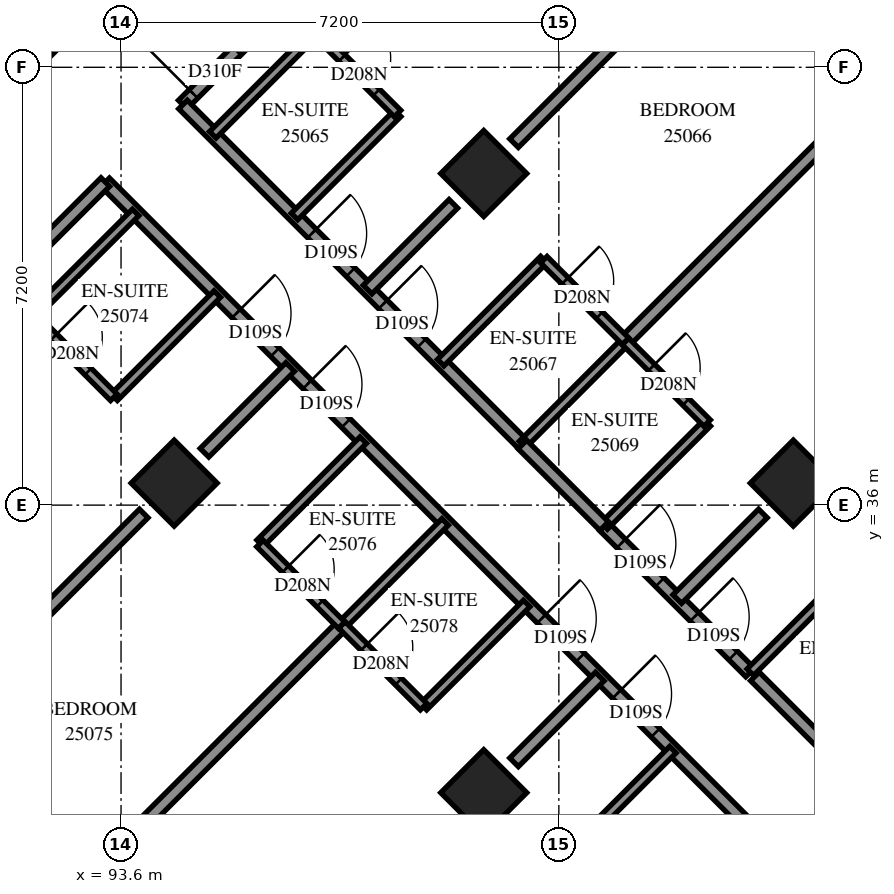
"""IFC4 building model, lengths in metres.
Left out: names, types, materials, properties, quantities, classifications, styles, units other than length and angle.
Written with IfcOpenShell. Run it as: python <this file> out.ifc"""

import sys

from ifc_helpers import new_model, si_unit, direction, frame, frame_2d, origin, origin_2d, place, context, subcontext, project, spatial, rectangle, extrude, element, fill, save


model = new_model("IFC4")
c1 = context("Model", 3, precision=1e-05, world=origin(), true_north=direction((0.0, 1.0)))
c2 = subcontext(c1, "Body", "Model", "MODEL_VIEW")
j1 = project(units=[si_unit("LENGTHUNIT", "METRE"), si_unit("PLANEANGLEUNIT", "RADIAN")], contexts=[c1])
p1 = place(None, origin())
s1 = spatial("IfcSite", under=j1, at=p1, CompositionType="ELEMENT")
p2 = place(p1, origin())
s2 = spatial("IfcBuilding", under=s1, at=p2, CompositionType="ELEMENT")
p3 = place(p2, frame((0.0, 0.0, 94.8)))
s3 = spatial("IfcBuildingStorey", under=s2, at=p3, CompositionType="ELEMENT", Elevation=94.8)
for number, where, z_axis, x_axis in (
    (1, (99.565, 41.453, 0.0), (0.0, 0.0, 1.0), (0.707, -0.707, 0.0)),
    (2, (94.474, 36.362, 0.0), (0.0, 0.0, 1.0), (0.707, -0.707, 0.0)),
    (3, (104.656, 36.362, 0.0), (0.0, 0.0, 1.0), (0.707, -0.707, 0.0)),
    (4, (99.565, 31.271, 0.0), (0.0, 0.0, 1.0), (0.707, -0.707, 0.0)),
):
    element("IfcColumn", number, at=place(p3, frame(where, z_axis=z_axis, x_axis=x_axis)), inside=s3, PredefinedType="COLUMN", context=c2, shape_type="SweptSolid", body=[
        extrude(rectangle(XDim=1.0, YDim=1.0, at=origin_2d()), origin(), (0.0, 0.0, 1.0), 3.1),
    ])
p4 = place(p3, frame((87.12, 38.625, -0.3), z_axis=(0.0, 0.0, 1.0), x_axis=(0.7071067812, 0.7071067812, 0.0)))
e5 = element("IfcWall", 5, at=p4, inside=s3, PredefinedType="SHEAR", context=c2, shape_type="SweptSolid", body=[
    extrude(rectangle(XDim=14.4, YDim=0.8, at=frame_2d((7.2, 0.0))), origin(), (0.0, 0.0, 1.0), 2.7),
])
p5 = place(p4, frame((4.55, 0.0, 0.3)))
e6 = element("IfcOpeningElement", 6, at=p5, cuts=e5, PredefinedType="OPENING", context=c2, shape_type="SweptSolid", body=[
    extrude(rectangle(XDim=1.1, YDim=2.1, at=frame_2d((0.55, 1.05))), frame((0.0, 0.41, 0.0), z_axis=(0.0, -1.0, 0.0), x_axis=(1.0, 0.0, 0.0)), (0.0, 0.0, 1.0), 0.82),
])
p6 = place(p4, frame((11.35, 0.0, 0.3)))
e7 = element("IfcOpeningElement", 7, at=p6, cuts=e5, PredefinedType="OPENING", context=c2, shape_type="SweptSolid", body=[
    extrude(rectangle(XDim=1.1, YDim=2.1, at=frame_2d((0.55, 1.05))), frame((0.0, 0.41, 0.0), z_axis=(0.0, -1.0, 0.0), x_axis=(1.0, 0.0, 0.0)), (0.0, 0.0, 1.0), 0.82),
])
p7 = place(p3, frame((93.339, 41.309, 0.0), z_axis=(0.0, 0.0, 1.0), x_axis=(0.7071067812, -0.7071067812, 0.0)))
e8 = element("IfcWall", 8, at=p7, inside=s3, PredefinedType="PARTITIONING", context=c2, shape_type="SweptSolid", body=[
    extrude(rectangle(XDim=18.702, YDim=0.2, at=frame_2d((9.351, 0.0))), origin(), (0.0, 0.0, 1.0), 3.1),
])
p8 = place(p7, frame((3.05, 0.0, 0.0)))
e9 = element("IfcOpeningElement", 9, at=p8, cuts=e8, PredefinedType="OPENING", context=c2, shape_type="SweptSolid", body=[
    extrude(rectangle(XDim=0.9, YDim=2.1, at=frame_2d((0.45, 1.05))), frame((0.0, 0.11, 0.0), z_axis=(0.0, -1.0, 0.0), x_axis=(1.0, 0.0, 0.0)), (0.0, 0.0, 1.0), 0.22),
])
p9 = place(p7, frame((4.7, 0.0, 0.0)))
e10 = element("IfcOpeningElement", 10, at=p9, cuts=e8, PredefinedType="OPENING", context=c2, shape_type="SweptSolid", body=[
    extrude(rectangle(XDim=0.9, YDim=2.1, at=frame_2d((0.45, 1.05))), frame((0.0, 0.11, 0.0), z_axis=(0.0, -1.0, 0.0), x_axis=(1.0, 0.0, 0.0)), (0.0, 0.0, 1.0), 0.22),
])
p10 = place(p7, frame((10.149, 0.0, 0.0)))
e11 = element("IfcOpeningElement", 11, at=p10, cuts=e8, PredefinedType="OPENING", context=c2, shape_type="SweptSolid", body=[
    extrude(rectangle(XDim=0.9, YDim=2.1, at=frame_2d((0.45, 1.05))), frame((0.0, 0.11, 0.0), z_axis=(0.0, -1.0, 0.0), x_axis=(1.0, 0.0, 0.0)), (0.0, 0.0, 1.0), 0.22),
])
p11 = place(p7, frame((11.9, 0.0, 0.0)))
e12 = element("IfcOpeningElement", 12, at=p11, cuts=e8, PredefinedType="OPENING", context=c2, shape_type="SweptSolid", body=[
    extrude(rectangle(XDim=0.9, YDim=2.1, at=frame_2d((0.45, 1.05))), frame((0.0, 0.11, 0.0), z_axis=(0.0, -1.0, 0.0), x_axis=(1.0, 0.0, 0.0)), (0.0, 0.0, 1.0), 0.22),
])
p12 = place(p7, frame((17.45, 0.0, 0.0)))
e13 = element("IfcOpeningElement", 13, at=p12, cuts=e8, PredefinedType="OPENING", context=c2, shape_type="SweptSolid", body=[
    extrude(rectangle(XDim=0.9, YDim=2.1, at=frame_2d((0.45, 1.05))), frame((0.0, 0.11, 0.0), z_axis=(0.0, -1.0, 0.0), x_axis=(1.0, 0.0, 0.0)), (0.0, 0.0, 1.0), 0.22),
])
p13 = place(p3, frame((86.835, 34.806, 0.0), z_axis=(0.0, 0.0, 1.0), x_axis=(0.7071067812, 0.7071067812, 0.0)))
e14 = element("IfcWall", 14, at=p13, inside=s3, PredefinedType="PARTITIONING", context=c2, shape_type="SweptSolid", body=[
    extrude(rectangle(XDim=9.201, YDim=0.2, at=frame_2d((4.601, 0.0))), origin(), (0.0, 0.0, 1.0), 3.1),
])
p14 = place(p3, frame((94.615, 42.587, 0.0), z_axis=(0.0, 0.0, 1.0), x_axis=(0.7071067812, 0.7071067812, 0.0)))
e15 = element("IfcWall", 15, at=p14, inside=s3, PredefinedType="PARTITIONING", context=c2, shape_type="SweptSolid", body=[
    extrude(rectangle(XDim=9.198, YDim=0.2, at=frame_2d((4.599, 0.0))), origin(), (0.0, 0.0, 1.0), 3.1),
])
p15 = place(p14, frame((0.248, 0.0, 0.0)))
e16 = element("IfcOpeningElement", 16, at=p15, cuts=e15, PredefinedType="OPENING", context=c2, shape_type="SweptSolid", body=[
    extrude(rectangle(XDim=1.0, YDim=2.1, at=frame_2d((0.5, 1.05))), frame((0.0, 0.11, 0.0), z_axis=(0.0, -1.0, 0.0), x_axis=(1.0, 0.0, 0.0)), (0.0, 0.0, 1.0), 0.22),
])
p16 = place(p3, frame((101.896, 38.698, 0.0), z_axis=(0.0, 0.0, 1.0), x_axis=(0.7072241589, 0.706989384, 0.0)))
e17 = element("IfcWall", 17, at=p16, inside=s3, PredefinedType="PARTITIONING", context=c2, shape_type="SweptSolid", body=[
    extrude(rectangle(XDim=8.519, YDim=0.2, at=frame_2d((4.259, 0.0))), origin(), (0.0, 0.0, 1.0), 3.1),
])
p17 = place(p3, frame((91.461, 28.253, 0.0), z_axis=(0.0, 0.0, 1.0), x_axis=(0.7072231255, 0.7069904178, 0.0)))
e18 = element("IfcWall", 18, at=p17, inside=s3, PredefinedType="PARTITIONING", context=c2, shape_type="SweptSolid", body=[
    extrude(rectangle(XDim=8.165, YDim=0.2, at=frame_2d((4.082, 0.0))), origin(), (0.0, 0.0, 1.0), 3.1),
])
p18 = place(p3, frame((94.62, 42.587, 0.0), z_axis=(0.0, 0.0, 1.0), x_axis=(0.7071067812, -0.7071067812, 0.0)))
e19 = element("IfcWall", 19, at=p18, inside=s3, PredefinedType="PARTITIONING", context=c2, shape_type="SweptSolid", body=[
    extrude(rectangle(XDim=7.9, YDim=0.2, at=frame_2d((3.95, 0.0))), origin(), (0.0, 0.0, 1.0), 3.1),
])
p19 = place(p18, frame((2.998, 0.0, 0.0)))
e20 = element("IfcOpeningElement", 20, at=p19, cuts=e19, PredefinedType="OPENING", context=c2, shape_type="SweptSolid", body=[
    extrude(rectangle(XDim=0.9, YDim=2.1, at=frame_2d((0.45, 1.05))), frame((0.0, 0.11, 0.0), z_axis=(0.0, -1.0, 0.0), x_axis=(1.0, 0.0, 0.0)), (0.0, 0.0, 1.0), 0.22),
])
p20 = place(p18, frame((4.649, 0.0, 0.0)))
e21 = element("IfcOpeningElement", 21, at=p20, cuts=e19, PredefinedType="OPENING", context=c2, shape_type="SweptSolid", body=[
    extrude(rectangle(XDim=0.9, YDim=2.1, at=frame_2d((0.45, 1.05))), frame((0.0, 0.11, 0.0), z_axis=(0.0, -1.0, 0.0), x_axis=(1.0, 0.0, 0.0)), (0.0, 0.0, 1.0), 0.22),
])
for number, where, z_axis, x_axis in (
    (22, (89.881, 31.771, 0.0), (0.0, 0.0, 1.0), (0.707, 0.707, 0.0)),
    (23, (100.063, 41.953, 0.0), (0.0, 0.0, 1.0), (0.707, 0.707, 0.0)),
):
    element("IfcWall", number, at=place(p3, frame(where, z_axis=z_axis, x_axis=x_axis)), inside=s3, PredefinedType="PARTITIONING", context=c2, shape_type="SweptSolid", body=[
        extrude(rectangle(XDim=5.787, YDim=0.2, at=frame_2d((2.893, 0.0))), origin(), (0.0, 0.0, 1.0), 3.1),
    ])
p21 = place(p3, frame((104.023, 33.184, 0.0), z_axis=(0.0, 0.0, 1.0), x_axis=(0.7071067812, -0.7071067812, 0.0)))
e24 = element("IfcWall", 24, at=p21, inside=s3, PredefinedType="PARTITIONING", context=c2, shape_type="SweptSolid", body=[
    extrude(rectangle(XDim=5.399, YDim=0.2, at=frame_2d((2.7, 0.0))), origin(), (0.0, 0.0, 1.0), 3.1),
])
p22 = place(p21, frame((4.08, 0.0, 0.0)))
e25 = element("IfcOpeningElement", 25, at=p22, cuts=e24, PredefinedType="OPENING", context=c2, shape_type="SweptSolid", body=[
    extrude(rectangle(XDim=0.9, YDim=2.1, at=frame_2d((0.45, 1.05))), frame((0.0, 0.11, 0.0), z_axis=(0.0, -1.0, 0.0), x_axis=(1.0, 0.0, 0.0)), (0.0, 0.0, 1.0), 0.22),
])
p23 = place(p3, frame((101.541, 35.651, 0.0), z_axis=(0.0, 0.0, 1.0), x_axis=(0.7071067812, -0.7071067812, 0.0)))
e26 = element("IfcWall", 26, at=p23, inside=s3, PredefinedType="PARTITIONING", context=c2, shape_type="SweptSolid", body=[
    extrude(rectangle(XDim=3.4, YDim=0.2, at=frame_2d((1.7, 0.0))), origin(), (0.0, 0.0, 1.0), 3.1),
])
p24 = place(p23, frame((0.4, 0.0, 0.0)))
e27 = element("IfcOpeningElement", 27, at=p24, cuts=e26, PredefinedType="OPENING", context=c2, shape_type="SweptSolid", body=[
    extrude(rectangle(XDim=0.9, YDim=2.1, at=frame_2d((0.45, 1.05))), frame((0.0, 0.11, 0.0), z_axis=(0.0, -1.0, 0.0), x_axis=(1.0, 0.0, 0.0)), (0.0, 0.0, 1.0), 0.22),
])
p25 = place(p23, frame((2.105, 0.0, 0.0)))
e28 = element("IfcOpeningElement", 28, at=p25, cuts=e26, PredefinedType="OPENING", context=c2, shape_type="SweptSolid", body=[
    extrude(rectangle(XDim=0.9, YDim=2.1, at=frame_2d((0.45, 1.05))), frame((0.0, 0.11, 0.0), z_axis=(0.0, -1.0, 0.0), x_axis=(1.0, 0.0, 0.0)), (0.0, 0.0, 1.0), 0.22),
])
for number, where, z_axis, x_axis in (
    (29, (100.977, 30.281, 0.0), (0.0, 0.0, 1.0), (0.707, 0.707, 0.0)),
    (30, (98.573, 32.685, 0.0), (0.0, 0.0, 1.0), (0.707, 0.707, 0.0)),
):
    element("IfcWall", number, at=place(p3, frame(where, z_axis=z_axis, x_axis=x_axis)), inside=s3, PredefinedType="PARTITIONING", context=c2, shape_type="SweptSolid", body=[
        extrude(rectangle(XDim=2.401, YDim=0.15, at=frame_2d((1.201, 0.0))), origin(), (0.0, 0.0, 1.0), 3.1),
    ])
for number, where, z_axis, x_axis in (
    (31, (92.143, 39.117, 0.0), (0.0, 0.0, 1.0), (0.708, 0.707, 0.0)),
    (32, (93.487, 37.773, 0.0), (0.0, 0.0, 1.0), (0.707, 0.708, 0.0)),
    (33, (97.234, 34.026, 0.0), (0.0, 0.0, 1.0), (0.707, 0.708, 0.0)),
    (34, (100.203, 36.997, 0.0), (0.0, 0.0, 1.0), (0.707, 0.708, 0.0)),
):
    element("IfcWall", number, at=place(p3, frame(where, z_axis=z_axis, x_axis=x_axis)), inside=s3, PredefinedType="PARTITIONING", context=c2, shape_type="SweptSolid", body=[
        extrude(rectangle(XDim=2.4, YDim=0.15, at=frame_2d((1.2, 0.0))), origin(), (0.0, 0.0, 1.0), 3.1),
    ])
for number, where, z_axis, x_axis in (
    (35, (96.453, 40.747, 0.0), (0.0, 0.0, 1.0), (0.707, 0.707, 0.0)),
    (36, (95.109, 42.091, 0.0), (0.0, 0.0, 1.0), (0.707, 0.707, 0.0)),
    (37, (95.887, 35.373, 0.0), (0.0, 0.0, 1.0), (0.707, 0.707, 0.0)),
    (38, (98.857, 38.343, 0.0), (0.0, 0.0, 1.0), (0.707, 0.707, 0.0)),
    (39, (101.545, 35.657, 0.0), (0.0, 0.0, 1.0), (0.707, 0.707, 0.0)),
    (40, (103.949, 33.253, 0.0), (0.0, 0.0, 1.0), (0.707, 0.707, 0.0)),
):
    element("IfcWall", number, at=place(p3, frame(where, z_axis=z_axis, x_axis=x_axis)), inside=s3, PredefinedType="PARTITIONING", context=c2, shape_type="SweptSolid", body=[
        extrude(rectangle(XDim=2.398, YDim=0.15, at=frame_2d((1.199, 0.0))), origin(), (0.0, 0.0, 1.0), 3.1),
    ])
for number, where, z_axis, x_axis in (
    (41, (100.063, 31.771, 0.0), (0.0, 0.0, 1.0), (0.707, 0.707, 0.0)),
    (42, (97.655, 39.545, 0.0), (0.0, 0.0, 1.0), (0.707, 0.707, 0.0)),
    (43, (94.972, 36.862, 0.0), (0.0, 0.0, 1.0), (0.707, 0.707, 0.0)),
):
    element("IfcWall", number, at=place(p3, frame(where, z_axis=z_axis, x_axis=x_axis)), inside=s3, PredefinedType="PARTITIONING", context=c2, shape_type="SweptSolid", body=[
        extrude(rectangle(XDim=1.994, YDim=0.2, at=frame_2d((0.997, 0.0))), origin(), (0.0, 0.0, 1.0), 3.1),
    ])
p26 = place(p3, frame((102.747, 34.455, 0.0), z_axis=(0.0, 0.0, 1.0), x_axis=(0.7071067812, 0.7071067812, 0.0)))
e44 = element("IfcWall", 44, at=p26, inside=s3, PredefinedType="PARTITIONING", context=c2, shape_type="SweptSolid", body=[
    extrude(rectangle(XDim=1.991, YDim=0.2, at=frame_2d((0.996, 0.0))), origin(), (0.0, 0.0, 1.0), 3.1),
])
p27 = place(p3, frame((96.803, 43.783, 0.0), z_axis=(0.0, 0.0, 1.0), x_axis=(0.7071067812, -0.7071067812, 0.0)))
e45 = element("IfcWall", 45, at=p27, inside=s3, PredefinedType="PARTITIONING", context=c2, shape_type="SweptSolid", body=[
    extrude(rectangle(XDim=1.901, YDim=0.15, at=frame_2d((0.95, 0.0))), origin(), (0.0, 0.0, 1.0), 3.1),
])
p28 = place(p27, frame((0.609, 0.0, 0.0)))
e46 = element("IfcOpeningElement", 46, at=p28, cuts=e45, PredefinedType="OPENING", context=c2, shape_type="SweptSolid", body=[
    extrude(rectangle(XDim=0.8, YDim=2.1, at=frame_2d((0.4, 1.05))), frame((0.0, 0.085, 0.0), z_axis=(0.0, -1.0, 0.0), x_axis=(1.0, 0.0, 0.0)), (0.0, 0.0, 1.0), 0.17),
])
p29 = place(p3, frame((101.894, 38.693, 0.0), z_axis=(0.0, 0.0, 1.0), x_axis=(0.7071067812, -0.7071067812, 0.0)))
e47 = element("IfcWall", 47, at=p29, inside=s3, PredefinedType="PARTITIONING", context=c2, shape_type="SweptSolid", body=[
    extrude(rectangle(XDim=1.901, YDim=0.15, at=frame_2d((0.95, 0.0))), origin(), (0.0, 0.0, 1.0), 3.1),
])
p30 = place(p29, frame((0.608, 0.0, 0.0)))
e48 = element("IfcOpeningElement", 48, at=p30, cuts=e47, PredefinedType="OPENING", context=c2, shape_type="SweptSolid", body=[
    extrude(rectangle(XDim=0.8, YDim=2.1, at=frame_2d((0.4, 1.05))), frame((0.0, 0.085, 0.0), z_axis=(0.0, -1.0, 0.0), x_axis=(1.0, 0.0, 0.0)), (0.0, 0.0, 1.0), 0.17),
])
p31 = place(p3, frame((95.885, 35.369, 0.0), z_axis=(0.0, 0.0, 1.0), x_axis=(0.7071067812, -0.7071067812, 0.0)))
e49 = element("IfcWall", 49, at=p31, inside=s3, PredefinedType="PARTITIONING", context=c2, shape_type="SweptSolid", body=[
    extrude(rectangle(XDim=1.901, YDim=0.15, at=frame_2d((0.95, 0.0))), origin(), (0.0, 0.0, 1.0), 3.1),
])
p32 = place(p31, frame((0.595, 0.0, 0.0)))
e50 = element("IfcOpeningElement", 50, at=p32, cuts=e49, PredefinedType="OPENING", context=c2, shape_type="SweptSolid", body=[
    extrude(rectangle(XDim=0.8, YDim=2.1, at=frame_2d((0.4, 1.05))), frame((0.0, 0.085, 0.0), z_axis=(0.0, -1.0, 0.0), x_axis=(1.0, 0.0, 0.0)), (0.0, 0.0, 1.0), 0.17),
])
p33 = place(p3, frame((92.137, 39.117, 0.0), z_axis=(0.0, 0.0, 1.0), x_axis=(0.7071067812, -0.7071067812, 0.0)))
e51 = element("IfcWall", 51, at=p33, inside=s3, PredefinedType="PARTITIONING", context=c2, shape_type="SweptSolid", body=[
    extrude(rectangle(XDim=1.901, YDim=0.15, at=frame_2d((0.95, 0.0))), origin(), (0.0, 0.0, 1.0), 3.1),
])
p34 = place(p33, frame((0.502, 0.0, 0.0)))
e52 = element("IfcOpeningElement", 52, at=p34, cuts=e51, PredefinedType="OPENING", context=c2, shape_type="SweptSolid", body=[
    extrude(rectangle(XDim=0.8, YDim=2.1, at=frame_2d((0.4, 1.05))), frame((0.0, 0.085, 0.0), z_axis=(0.0, -1.0, 0.0), x_axis=(1.0, 0.0, 0.0)), (0.0, 0.0, 1.0), 0.17),
])
p35 = place(p3, frame((100.553, 40.037, 0.0), z_axis=(0.0, 0.0, 1.0), x_axis=(0.7076330979, -0.7065800724, 0.0)))
e53 = element("IfcWall", 53, at=p35, inside=s3, PredefinedType="PARTITIONING", context=c2, shape_type="SweptSolid", body=[
    extrude(rectangle(XDim=1.899, YDim=0.15, at=frame_2d((0.95, 0.0))), origin(), (0.0, 0.0, 1.0), 3.1),
])
p36 = place(p35, frame((0.493, 0.0, 0.0)))
e54 = element("IfcOpeningElement", 54, at=p36, cuts=e53, PredefinedType="OPENING", context=c2, shape_type="SweptSolid", body=[
    extrude(rectangle(XDim=0.8, YDim=2.1, at=frame_2d((0.4, 1.05))), frame((0.0, 0.085, 0.0), z_axis=(0.0, -1.0, 0.0), x_axis=(1.0, 0.0, 0.0)), (0.0, 0.0, 1.0), 0.17),
])
p37 = place(p3, frame((97.233, 34.029, 0.0), z_axis=(0.0, 0.0, 1.0), x_axis=(0.7065800724, -0.7076330979, 0.0)))
e55 = element("IfcWall", 55, at=p37, inside=s3, PredefinedType="PARTITIONING", context=c2, shape_type="SweptSolid", body=[
    extrude(rectangle(XDim=1.899, YDim=0.15, at=frame_2d((0.95, 0.0))), origin(), (0.0, 0.0, 1.0), 3.1),
])
p38 = place(p37, frame((0.515, 0.0, 0.0)))
e56 = element("IfcOpeningElement", 56, at=p38, cuts=e55, PredefinedType="OPENING", context=c2, shape_type="SweptSolid", body=[
    extrude(rectangle(XDim=0.8, YDim=2.1, at=frame_2d((0.4, 1.05))), frame((0.0, 0.085, 0.0), z_axis=(0.0, -1.0, 0.0), x_axis=(1.0, 0.0, 0.0)), (0.0, 0.0, 1.0), 0.17),
])
p39 = place(p3, frame((100.201, 36.997, 0.0), z_axis=(0.0, 0.0, 1.0), x_axis=(0.7076330979, -0.7065800724, 0.0)))
e57 = element("IfcWall", 57, at=p39, inside=s3, PredefinedType="PARTITIONING", context=c2, shape_type="SweptSolid", body=[
    extrude(rectangle(XDim=1.899, YDim=0.2, at=frame_2d((0.95, 0.0))), origin(), (0.0, 0.0, 1.0), 3.1),
])
p40 = place(p15, origin())
e58 = element("IfcDoor", 58, at=p40, inside=s3, OperationType="SINGLE_SWING_RIGHT", PredefinedType="DOOR", context=c2, shape_type="SweptSolid", body=[
    extrude(rectangle(XDim=1.0, YDim=2.1, at=frame_2d((0.5, 1.05))), frame((0.0, 0.025, 0.0), z_axis=(0.0, -1.0, 0.0), x_axis=(1.0, 0.0, 0.0)), (0.0, 0.0, 1.0), 0.05),
])
fill(e16, e58)
p41 = place(p19, origin())
e59 = element("IfcDoor", 59, at=p41, inside=s3, OperationType="SINGLE_SWING_RIGHT", PredefinedType="DOOR", context=c2, shape_type="SweptSolid", body=[
    extrude(rectangle(XDim=0.9, YDim=2.1, at=frame_2d((0.45, 1.05))), frame((0.0, 0.025, 0.0), z_axis=(0.0, -1.0, 0.0), x_axis=(1.0, 0.0, 0.0)), (0.0, 0.0, 1.0), 0.05),
])
fill(e20, e59)
p42 = place(p28, origin())
e60 = element("IfcDoor", 60, at=p42, inside=s3, OperationType="SINGLE_SWING_RIGHT", PredefinedType="DOOR", context=c2, shape_type="SweptSolid", body=[
    extrude(rectangle(XDim=0.8, YDim=2.1, at=frame_2d((0.4, 1.05))), frame((0.0, 0.025, 0.0), z_axis=(0.0, -1.0, 0.0), x_axis=(1.0, 0.0, 0.0)), (0.0, 0.0, 1.0), 0.05),
])
fill(e46, e60)
p43 = place(p20, origin())
e61 = element("IfcDoor", 61, at=p43, inside=s3, OperationType="SINGLE_SWING_LEFT", PredefinedType="DOOR", context=c2, shape_type="SweptSolid", body=[
    extrude(rectangle(XDim=0.9, YDim=2.1, at=frame_2d((0.45, 1.05))), frame((0.0, 0.025, 0.0), z_axis=(0.0, -1.0, 0.0), x_axis=(1.0, 0.0, 0.0)), (0.0, 0.0, 1.0), 0.05),
])
fill(e21, e61)
p44 = place(p36, origin())
e62 = element("IfcDoor", 62, at=p44, inside=s3, OperationType="SINGLE_SWING_RIGHT", PredefinedType="DOOR", context=c2, shape_type="SweptSolid", body=[
    extrude(rectangle(XDim=0.8, YDim=2.1, at=frame_2d((0.4, 1.05))), frame((0.0, 0.025, 0.0), z_axis=(0.0, -1.0, 0.0), x_axis=(1.0, 0.0, 0.0)), (0.0, 0.0, 1.0), 0.05),
])
fill(e54, e62)
p45 = place(p24, origin())
e63 = element("IfcDoor", 63, at=p45, inside=s3, OperationType="SINGLE_SWING_RIGHT", PredefinedType="DOOR", context=c2, shape_type="SweptSolid", body=[
    extrude(rectangle(XDim=0.9, YDim=2.1, at=frame_2d((0.45, 1.05))), frame((0.0, 0.025, 0.0), z_axis=(0.0, -1.0, 0.0), x_axis=(1.0, 0.0, 0.0)), (0.0, 0.0, 1.0), 0.05),
])
fill(e27, e63)
p46 = place(p30, origin())
e64 = element("IfcDoor", 64, at=p46, inside=s3, OperationType="SINGLE_SWING_RIGHT", PredefinedType="DOOR", context=c2, shape_type="SweptSolid", body=[
    extrude(rectangle(XDim=0.8, YDim=2.1, at=frame_2d((0.4, 1.05))), frame((0.0, 0.025, 0.0), z_axis=(0.0, -1.0, 0.0), x_axis=(1.0, 0.0, 0.0)), (0.0, 0.0, 1.0), 0.05),
])
fill(e48, e64)
p47 = place(p25, origin())
e65 = element("IfcDoor", 65, at=p47, inside=s3, OperationType="SINGLE_SWING_LEFT", PredefinedType="DOOR", context=c2, shape_type="SweptSolid", body=[
    extrude(rectangle(XDim=0.9, YDim=2.1, at=frame_2d((0.45, 1.05))), frame((0.0, 0.025, 0.0), z_axis=(0.0, -1.0, 0.0), x_axis=(1.0, 0.0, 0.0)), (0.0, 0.0, 1.0), 0.05),
])
fill(e28, e65)
p48 = place(p8, origin())
e66 = element("IfcDoor", 66, at=p48, inside=s3, OperationType="SINGLE_SWING_LEFT", PredefinedType="DOOR", context=c2, shape_type="SweptSolid", body=[
    extrude(rectangle(XDim=0.9, YDim=2.1, at=frame_2d((0.45, 1.05))), frame((0.0, 0.025, 0.0), z_axis=(0.0, -1.0, 0.0), x_axis=(1.0, 0.0, 0.0)), (0.0, 0.0, 1.0), 0.05),
])
fill(e9, e66)
p49 = place(p34, origin())
e67 = element("IfcDoor", 67, at=p49, inside=s3, OperationType="SINGLE_SWING_RIGHT", PredefinedType="DOOR", context=c2, shape_type="SweptSolid", body=[
    extrude(rectangle(XDim=0.8, YDim=2.1, at=frame_2d((0.4, 1.05))), frame((0.0, 0.025, 0.0), z_axis=(0.0, -1.0, 0.0), x_axis=(1.0, 0.0, 0.0)), (0.0, 0.0, 1.0), 0.05),
])
fill(e52, e67)
p50 = place(p9, origin())
e68 = element("IfcDoor", 68, at=p50, inside=s3, OperationType="SINGLE_SWING_RIGHT", PredefinedType="DOOR", context=c2, shape_type="SweptSolid", body=[
    extrude(rectangle(XDim=0.9, YDim=2.1, at=frame_2d((0.45, 1.05))), frame((0.0, 0.025, 0.0), z_axis=(0.0, -1.0, 0.0), x_axis=(1.0, 0.0, 0.0)), (0.0, 0.0, 1.0), 0.05),
])
fill(e10, e68)
p51 = place(p32, origin())
e69 = element("IfcDoor", 69, at=p51, inside=s3, OperationType="SINGLE_SWING_RIGHT", PredefinedType="DOOR", context=c2, shape_type="SweptSolid", body=[
    extrude(rectangle(XDim=0.8, YDim=2.1, at=frame_2d((0.4, 1.05))), frame((0.0, 0.025, 0.0), z_axis=(0.0, -1.0, 0.0), x_axis=(1.0, 0.0, 0.0)), (0.0, 0.0, 1.0), 0.05),
])
fill(e50, e69)
p52 = place(p10, origin())
e70 = element("IfcDoor", 70, at=p52, inside=s3, OperationType="SINGLE_SWING_LEFT", PredefinedType="DOOR", context=c2, shape_type="SweptSolid", body=[
    extrude(rectangle(XDim=0.9, YDim=2.1, at=frame_2d((0.45, 1.05))), frame((0.0, 0.025, 0.0), z_axis=(0.0, -1.0, 0.0), x_axis=(1.0, 0.0, 0.0)), (0.0, 0.0, 1.0), 0.05),
])
fill(e11, e70)
p53 = place(p38, origin())
e71 = element("IfcDoor", 71, at=p53, inside=s3, OperationType="SINGLE_SWING_RIGHT", PredefinedType="DOOR", context=c2, shape_type="SweptSolid", body=[
    extrude(rectangle(XDim=0.8, YDim=2.1, at=frame_2d((0.4, 1.05))), frame((0.0, 0.025, 0.0), z_axis=(0.0, -1.0, 0.0), x_axis=(1.0, 0.0, 0.0)), (0.0, 0.0, 1.0), 0.05),
])
fill(e56, e71)
p54 = place(p11, origin())
e72 = element("IfcDoor", 72, at=p54, inside=s3, OperationType="SINGLE_SWING_RIGHT", PredefinedType="DOOR", context=c2, shape_type="SweptSolid", body=[
    extrude(rectangle(XDim=0.9, YDim=2.1, at=frame_2d((0.45, 1.05))), frame((0.0, 0.025, 0.0), z_axis=(0.0, -1.0, 0.0), x_axis=(1.0, 0.0, 0.0)), (0.0, 0.0, 1.0), 0.05),
])
fill(e12, e72)
save(model, sys.argv[1])
